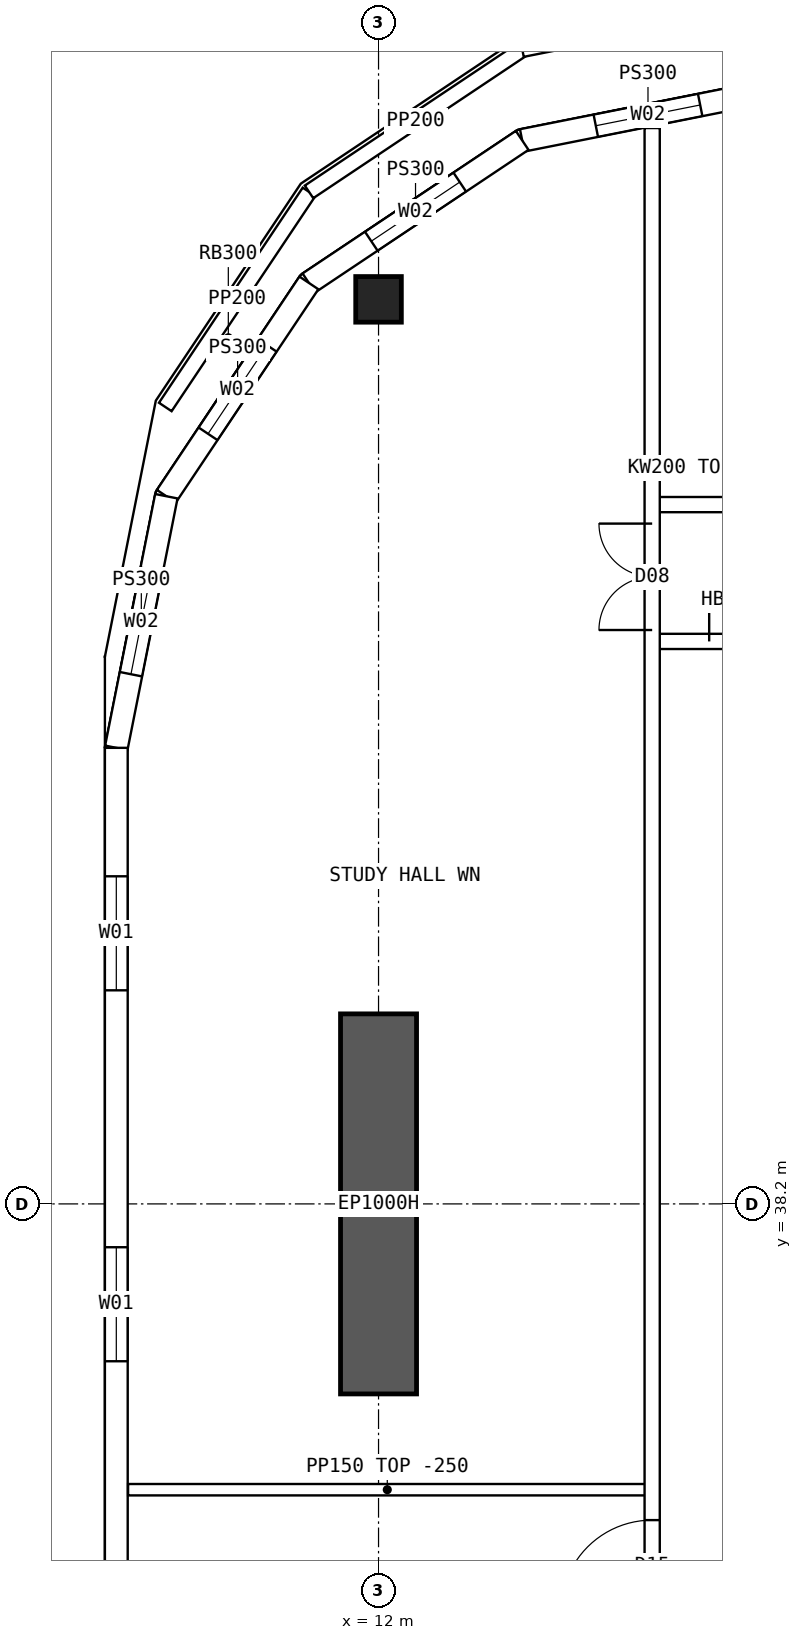
"""IFC4 building model, lengths in metres.
Left out: names, types, materials, properties, quantities, classifications, styles, units other than length and angle.
Written with IfcOpenShell. Run it as: python <this file> out.ifc"""

import sys

from ifc_helpers import new_model, si_unit, direction, frame, frame_2d, origin, origin_2d, place, context, subcontext, project, spatial, polyline, rectangle, hollow_rectangle, outline, extrude, element, fill, save


model = new_model("IFC4")
c1 = context("Model", 3, precision=1e-05, world=origin(), true_north=direction((0.0, 1.0)))
c2 = subcontext(c1, "Body", "Model", "MODEL_VIEW")
j1 = project(units=[si_unit("LENGTHUNIT", "METRE"), si_unit("PLANEANGLEUNIT", "RADIAN")], contexts=[c1])
p1 = place(None, origin())
s1 = spatial("IfcSite", under=j1, at=p1, CompositionType="ELEMENT")
p2 = place(p1, origin())
s2 = spatial("IfcBuilding", under=s1, at=p2, CompositionType="ELEMENT")
p3 = place(p2, frame((0.0, 0.0, 208.3)))
s3 = spatial("IfcBuildingStorey", under=s2, at=p3, CompositionType="ELEMENT", Elevation=208.3)
p4 = place(p3, frame((12.0, 50.1, 0.0), z_axis=(0.0, 0.0, 1.0), x_axis=(1.0, 0.0, 0.0)))
e1 = element("IfcColumn", 1, at=p4, inside=s3, PredefinedType="COLUMN", context=c2, shape_type="SweptSolid", body=[
    extrude(hollow_rectangle(XDim=0.6, YDim=0.6, WallThickness=0.06, at=origin_2d()), origin(), (0.0, 0.0, 1.0), 4.5),
])
p5 = place(p3, frame((12.0, 35.7, 0.0), z_axis=(0.0, 0.0, 1.0), x_axis=(0.0, 1.0, 0.0)))
e2 = element("IfcWall", 2, at=p5, inside=s3, PredefinedType="SHEAR", context=c2, shape_type="SweptSolid", body=[
    extrude(rectangle(XDim=5.0, YDim=1.0, at=frame_2d((2.5, 0.0))), origin(), (0.0, 0.0, 1.0), 4.5),
])
p6 = place(p3, frame((8.55, 44.2, 0.0), z_axis=(0.0, 0.0, 1.0), x_axis=(0.0, -1.0, 0.0)))
e3 = element("IfcWall", 3, at=p6, inside=s3, PredefinedType="SOLIDWALL", context=c2, shape_type="SweptSolid", body=[
    extrude(outline(polyline([(-0.015, -0.15), (24.415, -0.15), (24.385, 0.15), (0.015, 0.15), (-0.015, -0.15)])), origin(), (0.0, 0.0, 1.0), 4.25),
])
p7 = place(p6, frame((1.69, 0.0, 0.9)))
e4 = element("IfcOpeningElement", 4, at=p7, cuts=e3, PredefinedType="OPENING", context=c2, shape_type="SweptSolid", body=[
    extrude(rectangle(XDim=1.5, YDim=2.0, at=frame_2d((0.75, 1.0))), frame((0.0, 0.16, 0.0), z_axis=(0.0, -1.0, 0.0), x_axis=(1.0, 0.0, 0.0)), (0.0, 0.0, 1.0), 0.32),
])
p8 = place(p6, frame((6.57, 0.0, 0.9)))
e5 = element("IfcOpeningElement", 5, at=p8, cuts=e3, PredefinedType="OPENING", context=c2, shape_type="SweptSolid", body=[
    extrude(rectangle(XDim=1.5, YDim=2.0, at=frame_2d((0.75, 1.0))), frame((0.0, 0.16, 0.0), z_axis=(0.0, -1.0, 0.0), x_axis=(1.0, 0.0, 0.0)), (0.0, 0.0, 1.0), 0.32),
])
p9 = place(p6, frame((11.45, 0.0, 0.9)))
e6 = element("IfcOpeningElement", 6, at=p9, cuts=e3, PredefinedType="OPENING", context=c2, shape_type="SweptSolid", body=[
    extrude(rectangle(XDim=1.5, YDim=2.0, at=frame_2d((0.75, 1.0))), frame((0.0, 0.16, 0.0), z_axis=(0.0, -1.0, 0.0), x_axis=(1.0, 0.0, 0.0)), (0.0, 0.0, 1.0), 0.32),
])
p10 = place(p6, frame((16.33, 0.0, 0.9)))
e7 = element("IfcOpeningElement", 7, at=p10, cuts=e3, PredefinedType="OPENING", context=c2, shape_type="SweptSolid", body=[
    extrude(rectangle(XDim=1.5, YDim=2.0, at=frame_2d((0.75, 1.0))), frame((0.0, 0.16, 0.0), z_axis=(0.0, -1.0, 0.0), x_axis=(1.0, 0.0, 0.0)), (0.0, 0.0, 1.0), 0.32),
])
p11 = place(p6, frame((21.21, 0.0, 0.9)))
e8 = element("IfcOpeningElement", 8, at=p11, cuts=e3, PredefinedType="OPENING", context=c2, shape_type="SweptSolid", body=[
    extrude(rectangle(XDim=1.5, YDim=2.0, at=frame_2d((0.75, 1.0))), frame((0.0, 0.16, 0.0), z_axis=(0.0, -1.0, 0.0), x_axis=(1.0, 0.0, 0.0)), (0.0, 0.0, 1.0), 0.32),
])
p12 = place(p3, frame((17.2, 52.85, 0.0), z_axis=(0.0, 0.0, 1.0), x_axis=(-0.98078325777, -0.195100490205, 0.0)))
e9 = element("IfcWall", 9, at=p12, inside=s3, PredefinedType="SOLIDWALL", context=c2, shape_type="SweptSolid", body=[
    extrude(outline(polyline([(-0.03, -0.15), (3.405, -0.15), (3.345, 0.15), (0.03, 0.15), (-0.03, -0.15)])), origin(), (0.0, 0.0, 1.0), 4.25),
])
p13 = place(p12, frame((0.988, 0.0, 0.9)))
e10 = element("IfcOpeningElement", 10, at=p13, cuts=e9, PredefinedType="OPENING", context=c2, shape_type="SweptSolid", body=[
    extrude(rectangle(XDim=1.4, YDim=1.8, at=frame_2d((0.7, 0.9))), frame((0.0, 0.16, 0.0), z_axis=(0.0, -1.0, 0.0), x_axis=(1.0, 0.0, 0.0)), (0.0, 0.0, 1.0), 0.32),
])
p14 = place(p3, frame((13.89, 52.192, 0.0), z_axis=(0.0, 0.0, 1.0), x_axis=(-0.831460037396, -0.555584562613, 0.0)))
e11 = element("IfcWall", 11, at=p14, inside=s3, PredefinedType="SOLIDWALL", context=c2, shape_type="SweptSolid", body=[
    extrude(outline(polyline([(-0.03, -0.15), (3.405, -0.15), (3.345, 0.15), (0.03, 0.15), (-0.03, -0.15)])), origin(), (0.0, 0.0, 1.0), 4.25),
])
p15 = place(p14, frame((0.988, 0.0, 0.9)))
e12 = element("IfcOpeningElement", 12, at=p15, cuts=e11, PredefinedType="OPENING", context=c2, shape_type="SweptSolid", body=[
    extrude(rectangle(XDim=1.4, YDim=1.8, at=frame_2d((0.7, 0.9))), frame((0.0, 0.16, 0.0), z_axis=(0.0, -1.0, 0.0), x_axis=(1.0, 0.0, 0.0)), (0.0, 0.0, 1.0), 0.32),
])
p16 = place(p3, frame((11.083, 50.316, 0.0), z_axis=(0.0, 0.0, 1.0), x_axis=(-0.555567969291, -0.831471124873, 0.0)))
e13 = element("IfcWall", 13, at=p16, inside=s3, PredefinedType="SOLIDWALL", context=c2, shape_type="SweptSolid", body=[
    extrude(outline(polyline([(-0.03, -0.15), (3.405, -0.15), (3.345, 0.15), (0.03, 0.15), (-0.03, -0.15)])), origin(), (0.0, 0.0, 1.0), 4.25),
])
p17 = place(p16, frame((0.988, 0.0, 0.9)))
e14 = element("IfcOpeningElement", 14, at=p17, cuts=e13, PredefinedType="OPENING", context=c2, shape_type="SweptSolid", body=[
    extrude(rectangle(XDim=1.4, YDim=1.8, at=frame_2d((0.7, 0.9))), frame((0.0, 0.16, 0.0), z_axis=(0.0, -1.0, 0.0), x_axis=(1.0, 0.0, 0.0)), (0.0, 0.0, 1.0), 0.32),
])
p18 = place(p3, frame((9.208, 47.51, 0.0), z_axis=(0.0, 0.0, 1.0), x_axis=(-0.19508664885, -0.980786011034, 0.0)))
e15 = element("IfcWall", 15, at=p18, inside=s3, PredefinedType="SOLIDWALL", context=c2, shape_type="SweptSolid", body=[
    extrude(outline(polyline([(-0.03, -0.15), (3.39, -0.15), (3.36, 0.15), (0.03, 0.15), (-0.03, -0.15)])), origin(), (0.0, 0.0, 1.0), 4.25),
])
p19 = place(p18, frame((0.988, 0.0, 0.9)))
e16 = element("IfcOpeningElement", 16, at=p19, cuts=e15, PredefinedType="OPENING", context=c2, shape_type="SweptSolid", body=[
    extrude(rectangle(XDim=1.4, YDim=1.8, at=frame_2d((0.7, 0.9))), frame((0.0, 0.16, 0.0), z_axis=(0.0, -1.0, 0.0), x_axis=(1.0, 0.0, 0.0)), (0.0, 0.0, 1.0), 0.32),
])
p20 = place(p3, frame((9.195, 48.684, 0.0), z_axis=(0.0, 0.0, 1.0), x_axis=(0.555593699073, 0.831453932308, 0.0)))
e17 = element("IfcWall", 17, at=p20, inside=s3, PredefinedType="PARAPET", context=c2, shape_type="SweptSolid", body=[
    extrude(rectangle(XDim=3.404, YDim=0.2, at=frame_2d((1.702, 0.0))), origin(), (0.0, 0.0, 1.0), 1.1),
])
p21 = place(p3, frame((11.086, 51.514, 0.0), z_axis=(0.0, 0.0, 1.0), x_axis=(0.831448637767, 0.555601622348, 0.0)))
e18 = element("IfcWall", 18, at=p21, inside=s3, PredefinedType="PARAPET", context=c2, shape_type="SweptSolid", body=[
    extrude(rectangle(XDim=3.374, YDim=0.2, at=frame_2d((1.687, 0.0))), origin(), (0.0, 0.0, 1.0), 1.1),
])
p22 = place(p3, frame((13.891, 53.389, 0.0), z_axis=(0.0, 0.0, 1.0), x_axis=(0.980787925163, 0.195077025438, 0.0)))
e19 = element("IfcWall", 19, at=p22, inside=s3, PredefinedType="PARAPET", context=c2, shape_type="SweptSolid", body=[
    extrude(rectangle(XDim=3.389, YDim=0.2, at=frame_2d((1.695, 0.0))), origin(), (0.0, 0.0, 1.0), 1.1),
])
p23 = place(p3, frame((15.6, 47.4, 0.0), z_axis=(0.0, 0.0, 1.0), x_axis=(1.0, 0.0, 0.0)))
e20 = element("IfcWall", 20, at=p23, inside=s3, PredefinedType="SOLIDWALL", context=c2, shape_type="SweptSolid", body=[
    extrude(rectangle(XDim=2.05, YDim=0.2, at=frame_2d((1.025, 0.0))), origin(), (0.0, 0.0, 1.0), 4.25),
])
p24 = place(p23, frame((0.95, 0.0, 0.0)))
e21 = element("IfcOpeningElement", 21, at=p24, cuts=e20, PredefinedType="OPENING", context=c2, shape_type="SweptSolid", body=[
    extrude(rectangle(XDim=0.9, YDim=2.1, at=frame_2d((0.45, 1.05))), frame((0.0, 0.11, 0.0), z_axis=(0.0, -1.0, 0.0), x_axis=(1.0, 0.0, 0.0)), (0.0, 0.0, 1.0), 0.22),
])
p25 = place(p3, frame((15.6, 45.6, 0.0), z_axis=(0.0, 0.0, 1.0), x_axis=(1.0, 0.0, 0.0)))
e22 = element("IfcWall", 22, at=p25, inside=s3, PredefinedType="SOLIDWALL", context=c2, shape_type="SweptSolid", body=[
    extrude(rectangle(XDim=2.05, YDim=0.2, at=frame_2d((1.025, 0.0))), origin(), (0.0, 0.0, 1.0), 4.25),
])
p26 = place(p25, frame((0.75, 0.0, 0.0)))
e23 = element("IfcOpeningElement", 23, at=p26, cuts=e22, PredefinedType="OPENING", context=c2, shape_type="SweptSolid", body=[
    extrude(rectangle(XDim=1.2, YDim=2.1, at=frame_2d((0.6, 1.05))), frame((0.0, 0.11, 0.0), z_axis=(0.0, -1.0, 0.0), x_axis=(1.0, 0.0, 0.0)), (0.0, 0.0, 1.0), 0.22),
])
p27 = place(p3, frame((15.6, 11.646, 0.0), z_axis=(0.0, 0.0, 1.0), x_axis=(0.0, 1.0, 0.0)))
e24 = element("IfcWall", 24, at=p27, inside=s3, PredefinedType="SOLIDWALL", context=c2, shape_type="SweptSolid", body=[
    extrude(rectangle(XDim=40.708, YDim=0.2, at=frame_2d((20.354, 0.0))), origin(), (0.0, 0.0, 1.0), 4.25),
])
p28 = place(p27, frame((13.434, 0.0, 0.0)))
e25 = element("IfcOpeningElement", 25, at=p28, cuts=e24, PredefinedType="OPENING", context=c2, shape_type="SweptSolid", body=[
    extrude(rectangle(XDim=1.2, YDim=2.1, at=frame_2d((0.6, 1.05))), frame((0.0, 0.11, 0.0), z_axis=(0.0, -1.0, 0.0), x_axis=(1.0, 0.0, 0.0)), (0.0, 0.0, 1.0), 0.22),
])
p29 = place(p27, frame((21.194, 0.0, 0.0)))
e26 = element("IfcOpeningElement", 26, at=p29, cuts=e24, PredefinedType="OPENING", context=c2, shape_type="SweptSolid", body=[
    extrude(rectangle(XDim=1.2, YDim=2.1, at=frame_2d((0.6, 1.05))), frame((0.0, 0.11, 0.0), z_axis=(0.0, -1.0, 0.0), x_axis=(1.0, 0.0, 0.0)), (0.0, 0.0, 1.0), 0.22),
])
p30 = place(p27, frame((5.104, 0.0, 0.0)))
e27 = element("IfcOpeningElement", 27, at=p30, cuts=e24, PredefinedType="OPENING", context=c2, shape_type="SweptSolid", body=[
    extrude(rectangle(XDim=1.4, YDim=2.1, at=frame_2d((0.7, 1.05))), frame((0.0, 0.11, 0.0), z_axis=(0.0, -1.0, 0.0), x_axis=(1.0, 0.0, 0.0)), (0.0, 0.0, 1.0), 0.22),
])
p31 = place(p27, frame((34.104, 0.0, 0.0)))
e28 = element("IfcOpeningElement", 28, at=p31, cuts=e24, PredefinedType="OPENING", context=c2, shape_type="SweptSolid", body=[
    extrude(rectangle(XDim=1.4, YDim=2.1, at=frame_2d((0.7, 1.05))), frame((0.0, 0.11, 0.0), z_axis=(0.0, -1.0, 0.0), x_axis=(1.0, 0.0, 0.0)), (0.0, 0.0, 1.0), 0.22),
])
p32 = place(p3, frame((8.705, 34.44, 0.0), z_axis=(0.0, 0.0, 1.0), x_axis=(1.0, 0.0, 0.0)))
e29 = element("IfcWall", 29, at=p32, inside=s3, PredefinedType="PARTITIONING", context=c2, shape_type="SweptSolid", body=[
    extrude(outline(polyline([(0.0, 0.0), (6.82, 0.0), (6.82, 4.25), (3.597, 4.25), (3.595, 3.8), (2.997, 3.8), (2.995, 4.25), (0.0, 4.25), (0.0, 0.0)])), frame((0.0, 0.075, 0.0), z_axis=(0.0, -1.0, 0.0), x_axis=(1.0, 0.0, 0.0)), (0.0, 0.0, 1.0), 0.15),
])
p33 = place(p7, origin())
e30 = element("IfcWindow", 30, at=p33, inside=s3, PartitioningType="SINGLE_PANEL", PredefinedType="WINDOW", context=c2, shape_type="SweptSolid", body=[
    extrude(rectangle(XDim=1.5, YDim=2.0, at=frame_2d((0.75, 1.0))), frame((0.0, 0.03, 0.0), z_axis=(0.0, -1.0, 0.0), x_axis=(1.0, 0.0, 0.0)), (0.0, 0.0, 1.0), 0.06),
])
fill(e4, e30)
p34 = place(p8, origin())
e31 = element("IfcWindow", 31, at=p34, inside=s3, PartitioningType="SINGLE_PANEL", PredefinedType="WINDOW", context=c2, shape_type="SweptSolid", body=[
    extrude(rectangle(XDim=1.5, YDim=2.0, at=frame_2d((0.75, 1.0))), frame((0.0, 0.03, 0.0), z_axis=(0.0, -1.0, 0.0), x_axis=(1.0, 0.0, 0.0)), (0.0, 0.0, 1.0), 0.06),
])
fill(e5, e31)
p35 = place(p13, origin())
e32 = element("IfcWindow", 32, at=p35, inside=s3, PartitioningType="SINGLE_PANEL", PredefinedType="WINDOW", context=c2, shape_type="SweptSolid", body=[
    extrude(rectangle(XDim=1.4, YDim=1.8, at=frame_2d((0.7, 0.9))), frame((0.0, 0.03, 0.0), z_axis=(0.0, -1.0, 0.0), x_axis=(1.0, 0.0, 0.0)), (0.0, 0.0, 1.0), 0.06),
])
fill(e10, e32)
p36 = place(p15, origin())
e33 = element("IfcWindow", 33, at=p36, inside=s3, PartitioningType="SINGLE_PANEL", PredefinedType="WINDOW", context=c2, shape_type="SweptSolid", body=[
    extrude(rectangle(XDim=1.4, YDim=1.8, at=frame_2d((0.7, 0.9))), frame((0.0, 0.03, 0.0), z_axis=(0.0, -1.0, 0.0), x_axis=(1.0, 0.0, 0.0)), (0.0, 0.0, 1.0), 0.06),
])
fill(e12, e33)
p37 = place(p17, origin())
e34 = element("IfcWindow", 34, at=p37, inside=s3, PartitioningType="SINGLE_PANEL", PredefinedType="WINDOW", context=c2, shape_type="SweptSolid", body=[
    extrude(rectangle(XDim=1.4, YDim=1.8, at=frame_2d((0.7, 0.9))), frame((0.0, 0.03, 0.0), z_axis=(0.0, -1.0, 0.0), x_axis=(1.0, 0.0, 0.0)), (0.0, 0.0, 1.0), 0.06),
])
fill(e14, e34)
p38 = place(p19, origin())
e35 = element("IfcWindow", 35, at=p38, inside=s3, PartitioningType="SINGLE_PANEL", PredefinedType="WINDOW", context=c2, shape_type="SweptSolid", body=[
    extrude(rectangle(XDim=1.4, YDim=1.8, at=frame_2d((0.7, 0.9))), frame((0.0, 0.03, 0.0), z_axis=(0.0, -1.0, 0.0), x_axis=(1.0, 0.0, 0.0)), (0.0, 0.0, 1.0), 0.06),
])
fill(e16, e35)
p39 = place(p26, origin())
e36 = element("IfcDoor", 36, at=p39, inside=s3, OperationType="DOUBLE_DOOR_SINGLE_SWING", PredefinedType="DOOR", context=c2, shape_type="SweptSolid", body=[
    extrude(rectangle(XDim=1.2, YDim=2.1, at=frame_2d((0.6, 1.05))), frame((0.0, 0.025, 0.0), z_axis=(0.0, -1.0, 0.0), x_axis=(1.0, 0.0, 0.0)), (0.0, 0.0, 1.0), 0.05),
])
fill(e23, e36)
p40 = place(p29, origin())
e37 = element("IfcDoor", 37, at=p40, inside=s3, OperationType="SINGLE_SWING_LEFT", PredefinedType="DOOR", context=c2, shape_type="SweptSolid", body=[
    extrude(rectangle(XDim=1.2, YDim=2.1, at=frame_2d((0.6, 1.05))), frame((0.0, 0.025, 0.0), z_axis=(0.0, -1.0, 0.0), x_axis=(1.0, 0.0, 0.0)), (0.0, 0.0, 1.0), 0.05),
])
fill(e26, e37)
p41 = place(p31, origin())
e38 = element("IfcDoor", 38, at=p41, inside=s3, OperationType="DOUBLE_DOOR_SINGLE_SWING", PredefinedType="DOOR", context=c2, shape_type="SweptSolid", body=[
    extrude(rectangle(XDim=1.4, YDim=2.1, at=frame_2d((0.7, 1.05))), frame((0.0, 0.025, 0.0), z_axis=(0.0, -1.0, 0.0), x_axis=(1.0, 0.0, 0.0)), (0.0, 0.0, 1.0), 0.05),
])
fill(e28, e38)
save(model, sys.argv[1])
